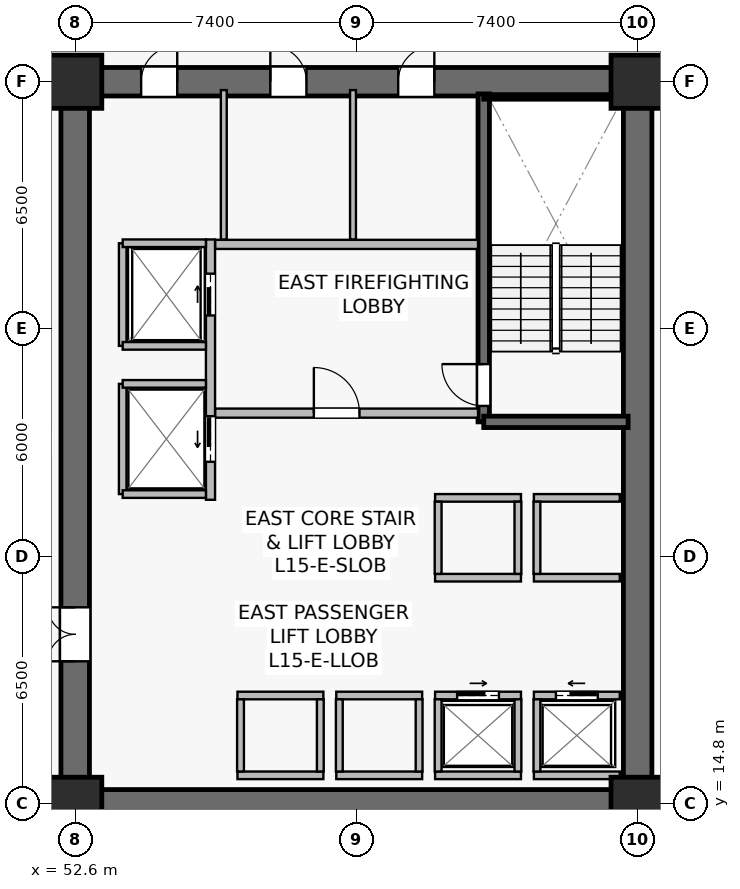
"""IFC4 building model, lengths in metres.
Left out: names, types, materials, properties, quantities, classifications, styles, units other than length and angle.
Written with IfcOpenShell. Run it as: python <this file> out.ifc"""

import sys

from ifc_helpers import new_model, si_unit, direction, frame, frame_2d, origin, origin_2d, place, context, subcontext, project, spatial, rectangle, extrude, source, transform, mapped, element, fill, save


model = new_model("IFC4")
c1 = context("Model", 3, precision=1e-05, world=origin(), true_north=direction((0.0, 1.0)))
c2 = subcontext(c1, "Body", "Model", "MODEL_VIEW")
j1 = project(units=[si_unit("LENGTHUNIT", "METRE"), si_unit("PLANEANGLEUNIT", "RADIAN")], contexts=[c1])
p1 = place(None, origin())
s1 = spatial("IfcSite", under=j1, at=p1, CompositionType="ELEMENT")
p2 = place(p1, origin())
s2 = spatial("IfcBuilding", under=s1, at=p2, CompositionType="ELEMENT")
p3 = place(p2, frame((0.0, 0.0, 62.1)))
s3 = spatial("IfcBuildingStorey", under=s2, at=p3, CompositionType="ELEMENT", Elevation=62.1)
p4 = place(p3, frame((52.225, 14.8, 0.0), z_axis=(0.0, 0.0, 1.0), x_axis=(1.0, 0.0, 0.0)))
e1 = element("IfcWall", 1, at=p4, inside=s3, PredefinedType="SHEAR", context=c2, shape_type="SweptSolid", body=[
    extrude(rectangle(XDim=15.55, YDim=0.75, at=frame_2d((7.775, 0.0))), origin(), (0.0, 0.0, 1.0), 3.78),
])
p5 = place(p3, frame((52.225, 33.8, 0.0), z_axis=(0.0, 0.0, 1.0), x_axis=(1.0, 0.0, 0.0)))
e2 = element("IfcWall", 2, at=p5, inside=s3, PredefinedType="SHEAR", context=c2, shape_type="SweptSolid", body=[
    extrude(rectangle(XDim=15.55, YDim=0.75, at=frame_2d((7.775, 0.0))), origin(), (0.0, 0.0, 1.0), 3.78),
])
p6 = place(p5, frame((8.875, 0.0, 0.0)))
e3 = element("IfcOpeningElement", 3, at=p6, cuts=e2, PredefinedType="OPENING", context=c2, shape_type="SweptSolid", body=[
    extrude(rectangle(XDim=0.95, YDim=2.15, at=frame_2d((0.475, 1.075))), frame((0.0, 0.385, 0.0), z_axis=(0.0, -1.0, 0.0), x_axis=(1.0, 0.0, 0.0)), (0.0, 0.0, 1.0), 0.77),
])
p7 = place(p5, frame((5.51, 0.0, 0.0)))
e4 = element("IfcOpeningElement", 4, at=p7, cuts=e2, PredefinedType="OPENING", context=c2, shape_type="SweptSolid", body=[
    extrude(rectangle(XDim=0.95, YDim=2.15, at=frame_2d((0.475, 1.075))), frame((0.0, 0.385, 0.0), z_axis=(0.0, -1.0, 0.0), x_axis=(1.0, 0.0, 0.0)), (0.0, 0.0, 1.0), 0.77),
])
p8 = place(p5, frame((2.11, 0.0, 0.0)))
e5 = element("IfcOpeningElement", 5, at=p8, cuts=e2, PredefinedType="OPENING", context=c2, shape_type="SweptSolid", body=[
    extrude(rectangle(XDim=0.95, YDim=2.15, at=frame_2d((0.475, 1.075))), frame((0.0, 0.385, 0.0), z_axis=(0.0, -1.0, 0.0), x_axis=(1.0, 0.0, 0.0)), (0.0, 0.0, 1.0), 0.77),
])
p9 = place(p3, frame((52.6, 15.175, 0.0), z_axis=(0.0, 0.0, 1.0), x_axis=(0.0, 1.0, 0.0)))
e6 = element("IfcWall", 6, at=p9, inside=s3, PredefinedType="SHEAR", context=c2, shape_type="SweptSolid", body=[
    extrude(rectangle(XDim=18.25, YDim=0.75, at=frame_2d((9.125, 0.0))), origin(), (0.0, 0.0, 1.0), 3.78),
])
p10 = place(p9, frame((3.375, 0.0, 0.0)))
e7 = element("IfcOpeningElement", 7, at=p10, cuts=e6, PredefinedType="OPENING", context=c2, shape_type="SweptSolid", body=[
    extrude(rectangle(XDim=1.42, YDim=2.2, at=frame_2d((0.71, 1.1))), frame((0.0, 0.385, 0.0), z_axis=(0.0, -1.0, 0.0), x_axis=(1.0, 0.0, 0.0)), (0.0, 0.0, 1.0), 0.77),
])
p11 = place(p3, frame((67.4, 15.175, 0.0), z_axis=(0.0, 0.0, 1.0), x_axis=(0.0, 1.0, 0.0)))
e8 = element("IfcWall", 8, at=p11, inside=s3, PredefinedType="SHEAR", context=c2, shape_type="SweptSolid", body=[
    extrude(rectangle(XDim=18.25, YDim=0.75, at=frame_2d((9.125, 0.0))), origin(), (0.0, 0.0, 1.0), 3.78),
])
p12 = place(p3, frame((63.35, 24.85, 0.0), z_axis=(0.0, 0.0, 1.0), x_axis=(0.0, 1.0, 0.0)))
e9 = element("IfcWall", 9, at=p12, inside=s3, PredefinedType="SHEAR", context=c2, shape_type="SweptSolid", body=[
    extrude(rectangle(XDim=8.63, YDim=0.3, at=frame_2d((4.315, 0.0))), origin(), (0.0, 0.0, 1.0), 3.78),
])
p13 = place(p12, frame((0.42, 0.0, 0.0)))
e10 = element("IfcOpeningElement", 10, at=p13, cuts=e9, PredefinedType="OPENING", context=c2, shape_type="SweptSolid", body=[
    extrude(rectangle(XDim=1.1, YDim=2.15, at=frame_2d((0.55, 1.075))), frame((0.0, 0.16, 0.0), z_axis=(0.0, -1.0, 0.0), x_axis=(1.0, 0.0, 0.0)), (0.0, 0.0, 1.0), 0.32),
])
p14 = place(p3, frame((63.35, 24.85, 0.0), z_axis=(0.0, 0.0, 1.0), x_axis=(1.0, 0.0, 0.0)))
e11 = element("IfcWall", 11, at=p14, inside=s3, PredefinedType="SHEAR", context=c2, shape_type="SweptSolid", body=[
    extrude(rectangle(XDim=3.8, YDim=0.3, at=frame_2d((1.9, 0.0))), origin(), (0.0, 0.0, 1.0), 3.78),
])
p15 = place(p3, frame((63.35, 33.4, 0.0), z_axis=(0.0, 0.0, 1.0), x_axis=(1.0, 0.0, 0.0)))
e12 = element("IfcWall", 12, at=p15, inside=s3, PredefinedType="SOLIDWALL", context=c2, shape_type="SweptSolid", body=[
    extrude(rectangle(XDim=3.72, YDim=0.12, at=frame_2d((1.86, 0.0))), origin(), (0.0, 0.0, 1.0), 3.78),
])
m1 = source(origin(), c2, "Body", "SweptSolid", [
    extrude(rectangle(XDim=1.4, YDim=1.4, at=origin_2d()), origin(), (0.0, 0.0, 1.0), 4.1),
])
for number, where, z_axis, x_axis in (
    (13, (52.6, 14.8, 0.0), (0.0, 0.0, 1.0), (1.0, 0.0, 0.0)),
    (14, (67.4, 14.8, 0.0), (0.0, 0.0, 1.0), (1.0, 0.0, 0.0)),
    (15, (52.6, 33.8, 0.0), (0.0, 0.0, 1.0), (1.0, 0.0, 0.0)),
    (16, (67.4, 33.8, 0.0), (0.0, 0.0, 1.0), (1.0, 0.0, 0.0)),
):
    element("IfcColumn", number, at=place(p3, frame(where, z_axis=z_axis, x_axis=x_axis)), inside=s3, PredefinedType="COLUMN", context=c2, shape_type="MappedRepresentation", body=[
        mapped(m1, transform((0.0, 0.0, 0.0), scale=1.0)),
    ])
p16 = place(p3, frame((56.28, 25.08, 0.0), z_axis=(0.0, 0.0, 1.0), x_axis=(1.0, 0.0, 0.0)))
e17 = element("IfcWall", 17, at=p16, inside=s3, PredefinedType="SOLIDWALL", context=c2, shape_type="SweptSolid", body=[
    extrude(rectangle(XDim=6.92, YDim=0.24, at=frame_2d((3.46, 0.0))), origin(), (0.0, 0.0, 1.0), 3.115),
])
p17 = place(p16, frame((2.6, 0.0, 0.0)))
e18 = element("IfcOpeningElement", 18, at=p17, cuts=e17, PredefinedType="OPENING", context=c2, shape_type="SweptSolid", body=[
    extrude(rectangle(XDim=1.2, YDim=2.16, at=frame_2d((0.6, 1.08))), frame((0.0, 0.13, 0.0), z_axis=(0.0, -1.0, 0.0), x_axis=(1.0, 0.0, 0.0)), (0.0, 0.0, 1.0), 0.26),
])
p18 = place(p3, frame((56.28, 29.52, 0.0), z_axis=(0.0, 0.0, 1.0), x_axis=(1.0, 0.0, 0.0)))
e19 = element("IfcWall", 19, at=p18, inside=s3, PredefinedType="SOLIDWALL", context=c2, shape_type="SweptSolid", body=[
    extrude(rectangle(XDim=6.92, YDim=0.24, at=frame_2d((3.46, 0.0))), origin(), (0.0, 0.0, 1.0), 3.115),
])
p19 = place(p3, frame((56.16, 22.8, 0.0), z_axis=(0.0, 0.0, 1.0), x_axis=(0.0, 1.0, 0.0)))
e20 = element("IfcWall", 20, at=p19, inside=s3, PredefinedType="SOLIDWALL", context=c2, shape_type="SweptSolid", body=[
    extrude(rectangle(XDim=6.85, YDim=0.24, at=frame_2d((3.425, 0.0))), origin(), (0.0, 0.0, 1.0), 2.865),
])
p20 = place(p19, frame((4.85, 0.0, 0.0)))
e21 = element("IfcOpeningElement", 21, at=p20, cuts=e20, PredefinedType="OPENING", context=c2, shape_type="SweptSolid", body=[
    extrude(rectangle(XDim=1.1, YDim=2.22, at=frame_2d((0.55, 1.11))), frame((0.0, 0.13, 0.0), z_axis=(0.0, -1.0, 0.0), x_axis=(1.0, 0.0, 0.0)), (0.0, 0.0, 1.0), 0.26),
])
p21 = place(p19, frame((1.0, 0.0, 0.0)))
e22 = element("IfcOpeningElement", 22, at=p21, cuts=e20, PredefinedType="OPENING", context=c2, shape_type="SweptSolid", body=[
    extrude(rectangle(XDim=1.2, YDim=2.22, at=frame_2d((0.6, 1.11))), frame((0.0, 0.13, 0.0), z_axis=(0.0, -1.0, 0.0), x_axis=(1.0, 0.0, 0.0)), (0.0, 0.0, 1.0), 0.26),
])
p22 = place(p3, frame((64.67, 17.65, 0.0), z_axis=(0.0, 0.0, 1.0), x_axis=(1.0, 0.0, 0.0)))
e23 = element("IfcWall", 23, at=p22, inside=s3, PredefinedType="SOLIDWALL", context=c2, shape_type="SweptSolid", body=[
    extrude(rectangle(XDim=2.26, YDim=0.2, at=frame_2d((1.13, 0.0))), origin(), (0.0, 0.0, 1.0), 3.78),
])
p23 = place(p22, frame((0.58, 0.0, 0.0)))
e24 = element("IfcOpeningElement", 24, at=p23, cuts=e23, PredefinedType="OPENING", context=c2, shape_type="SweptSolid", body=[
    extrude(rectangle(XDim=1.1, YDim=2.22, at=frame_2d((0.55, 1.11))), frame((0.0, 0.11, 0.0), z_axis=(0.0, -1.0, 0.0), x_axis=(1.0, 0.0, 0.0)), (0.0, 0.0, 1.0), 0.22),
])
p24 = place(p3, frame((64.67, 15.55, 0.0), z_axis=(0.0, 0.0, 1.0), x_axis=(1.0, 0.0, 0.0)))
e25 = element("IfcWall", 25, at=p24, inside=s3, PredefinedType="SOLIDWALL", context=c2, shape_type="SweptSolid", body=[
    extrude(rectangle(XDim=2.26, YDim=0.2, at=frame_2d((1.13, 0.0))), origin(), (0.0, 0.0, 1.0), 3.78),
])
p25 = place(p3, frame((64.75, 15.65, 0.0), z_axis=(0.0, 0.0, 1.0), x_axis=(0.0, 1.0, 0.0)))
e26 = element("IfcWall", 26, at=p25, inside=s3, PredefinedType="SOLIDWALL", context=c2, shape_type="SweptSolid", body=[
    extrude(rectangle(XDim=1.9, YDim=0.18, at=frame_2d((0.95, 0.0))), origin(), (0.0, 0.0, 1.0), 3.78),
])
p26 = place(p3, frame((62.07, 17.65, 0.0), z_axis=(0.0, 0.0, 1.0), x_axis=(1.0, 0.0, 0.0)))
e27 = element("IfcWall", 27, at=p26, inside=s3, PredefinedType="SOLIDWALL", context=c2, shape_type="SweptSolid", body=[
    extrude(rectangle(XDim=2.26, YDim=0.2, at=frame_2d((1.13, 0.0))), origin(), (0.0, 0.0, 1.0), 3.78),
])
p27 = place(p26, frame((0.58, 0.0, 0.0)))
e28 = element("IfcOpeningElement", 28, at=p27, cuts=e27, PredefinedType="OPENING", context=c2, shape_type="SweptSolid", body=[
    extrude(rectangle(XDim=1.1, YDim=2.22, at=frame_2d((0.55, 1.11))), frame((0.0, 0.11, 0.0), z_axis=(0.0, -1.0, 0.0), x_axis=(1.0, 0.0, 0.0)), (0.0, 0.0, 1.0), 0.22),
])
p28 = place(p3, frame((62.07, 15.55, 0.0), z_axis=(0.0, 0.0, 1.0), x_axis=(1.0, 0.0, 0.0)))
e29 = element("IfcWall", 29, at=p28, inside=s3, PredefinedType="SOLIDWALL", context=c2, shape_type="SweptSolid", body=[
    extrude(rectangle(XDim=2.26, YDim=0.2, at=frame_2d((1.13, 0.0))), origin(), (0.0, 0.0, 1.0), 3.78),
])
for number, where, z_axis, x_axis in (
    (30, (62.15, 15.65, 0.0), (0.0, 0.0, 1.0), (0.0, 1.0, 0.0)),
    (31, (64.25, 15.65, 0.0), (0.0, 0.0, 1.0), (0.0, 1.0, 0.0)),
):
    element("IfcWall", number, at=place(p3, frame(where, z_axis=z_axis, x_axis=x_axis)), inside=s3, PredefinedType="SOLIDWALL", context=c2, shape_type="SweptSolid", body=[
        extrude(rectangle(XDim=1.9, YDim=0.18, at=frame_2d((0.95, 0.0))), origin(), (0.0, 0.0, 1.0), 3.78),
    ])
for number, where, z_axis, x_axis in (
    (32, (59.47, 17.65, 0.0), (0.0, 0.0, 1.0), (1.0, 0.0, 0.0)),
    (33, (59.47, 15.55, 0.0), (0.0, 0.0, 1.0), (1.0, 0.0, 0.0)),
):
    element("IfcWall", number, at=place(p3, frame(where, z_axis=z_axis, x_axis=x_axis)), inside=s3, PredefinedType="SOLIDWALL", context=c2, shape_type="SweptSolid", body=[
        extrude(rectangle(XDim=2.26, YDim=0.2, at=frame_2d((1.13, 0.0))), origin(), (0.0, 0.0, 1.0), 3.115),
    ])
for number, where, z_axis, x_axis in (
    (34, (59.55, 15.65, 0.0), (0.0, 0.0, 1.0), (0.0, 1.0, 0.0)),
    (35, (61.65, 15.65, 0.0), (0.0, 0.0, 1.0), (0.0, 1.0, 0.0)),
):
    element("IfcWall", number, at=place(p3, frame(where, z_axis=z_axis, x_axis=x_axis)), inside=s3, PredefinedType="SOLIDWALL", context=c2, shape_type="SweptSolid", body=[
        extrude(rectangle(XDim=1.9, YDim=0.18, at=frame_2d((0.95, 0.0))), origin(), (0.0, 0.0, 1.0), 3.78),
    ])
for number, where, z_axis, x_axis in (
    (36, (56.87, 17.65, 0.0), (0.0, 0.0, 1.0), (1.0, 0.0, 0.0)),
    (37, (56.87, 15.55, 0.0), (0.0, 0.0, 1.0), (1.0, 0.0, 0.0)),
):
    element("IfcWall", number, at=place(p3, frame(where, z_axis=z_axis, x_axis=x_axis)), inside=s3, PredefinedType="SOLIDWALL", context=c2, shape_type="SweptSolid", body=[
        extrude(rectangle(XDim=2.26, YDim=0.2, at=frame_2d((1.13, 0.0))), origin(), (0.0, 0.0, 1.0), 3.78),
    ])
for number, where, z_axis, x_axis in (
    (38, (56.95, 15.65, 0.0), (0.0, 0.0, 1.0), (0.0, 1.0, 0.0)),
    (39, (59.05, 15.65, 0.0), (0.0, 0.0, 1.0), (0.0, 1.0, 0.0)),
):
    element("IfcWall", number, at=place(p3, frame(where, z_axis=z_axis, x_axis=x_axis)), inside=s3, PredefinedType="SOLIDWALL", context=c2, shape_type="SweptSolid", body=[
        extrude(rectangle(XDim=1.9, YDim=0.18, at=frame_2d((0.95, 0.0))), origin(), (0.0, 0.0, 1.0), 3.78),
    ])
for number, where, z_axis, x_axis in (
    (40, (64.67, 20.75, 0.0), (0.0, 0.0, 1.0), (1.0, 0.0, 0.0)),
    (41, (64.67, 22.85, 0.0), (0.0, 0.0, 1.0), (1.0, 0.0, 0.0)),
):
    element("IfcWall", number, at=place(p3, frame(where, z_axis=z_axis, x_axis=x_axis)), inside=s3, PredefinedType="SOLIDWALL", context=c2, shape_type="SweptSolid", body=[
        extrude(rectangle(XDim=2.26, YDim=0.2, at=frame_2d((1.13, 0.0))), origin(), (0.0, 0.0, 1.0), 3.78),
    ])
p29 = place(p3, frame((64.75, 20.85, 0.0), z_axis=(0.0, 0.0, 1.0), x_axis=(0.0, 1.0, 0.0)))
e42 = element("IfcWall", 42, at=p29, inside=s3, PredefinedType="SOLIDWALL", context=c2, shape_type="SweptSolid", body=[
    extrude(rectangle(XDim=1.9, YDim=0.18, at=frame_2d((0.95, 0.0))), origin(), (0.0, 0.0, 1.0), 3.78),
])
for number, where, z_axis, x_axis in (
    (43, (62.07, 20.75, 0.0), (0.0, 0.0, 1.0), (1.0, 0.0, 0.0)),
    (44, (62.07, 22.85, 0.0), (0.0, 0.0, 1.0), (1.0, 0.0, 0.0)),
):
    element("IfcWall", number, at=place(p3, frame(where, z_axis=z_axis, x_axis=x_axis)), inside=s3, PredefinedType="SOLIDWALL", context=c2, shape_type="SweptSolid", body=[
        extrude(rectangle(XDim=2.26, YDim=0.2, at=frame_2d((1.13, 0.0))), origin(), (0.0, 0.0, 1.0), 3.78),
    ])
for number, where, z_axis, x_axis in (
    (45, (62.15, 20.85, 0.0), (0.0, 0.0, 1.0), (0.0, 1.0, 0.0)),
    (46, (64.25, 20.85, 0.0), (0.0, 0.0, 1.0), (0.0, 1.0, 0.0)),
):
    element("IfcWall", number, at=place(p3, frame(where, z_axis=z_axis, x_axis=x_axis)), inside=s3, PredefinedType="SOLIDWALL", context=c2, shape_type="SweptSolid", body=[
        extrude(rectangle(XDim=1.9, YDim=0.18, at=frame_2d((0.95, 0.0))), origin(), (0.0, 0.0, 1.0), 3.78),
    ])
p30 = place(p3, frame((53.85, 26.85, 0.0), z_axis=(0.0, 0.0, 1.0), x_axis=(0.0, 1.0, 0.0)))
e47 = element("IfcWall", 47, at=p30, inside=s3, PredefinedType="SOLIDWALL", context=c2, shape_type="SweptSolid", body=[
    extrude(rectangle(XDim=2.7, YDim=0.2, at=frame_2d((1.35, 0.0))), origin(), (0.0, 0.0, 1.0), 3.78),
])
p31 = place(p3, frame((53.85, 29.55, 0.0), z_axis=(0.0, 0.0, 1.0), x_axis=(1.0, 0.0, 0.0)))
e48 = element("IfcWall", 48, at=p31, inside=s3, PredefinedType="SOLIDWALL", context=c2, shape_type="SweptSolid", body=[
    extrude(rectangle(XDim=2.19, YDim=0.2, at=frame_2d((1.095, 0.0))), origin(), (0.0, 0.0, 1.0), 3.78),
])
p32 = place(p3, frame((53.85, 26.85, 0.0), z_axis=(0.0, 0.0, 1.0), x_axis=(1.0, 0.0, 0.0)))
e49 = element("IfcWall", 49, at=p32, inside=s3, PredefinedType="SOLIDWALL", context=c2, shape_type="SweptSolid", body=[
    extrude(rectangle(XDim=2.19, YDim=0.2, at=frame_2d((1.095, 0.0))), origin(), (0.0, 0.0, 1.0), 3.177),
])
p33 = place(p3, frame((53.85, 22.95, 0.0), z_axis=(0.0, 0.0, 1.0), x_axis=(0.0, 1.0, 0.0)))
e50 = element("IfcWall", 50, at=p33, inside=s3, PredefinedType="SOLIDWALL", context=c2, shape_type="SweptSolid", body=[
    extrude(rectangle(XDim=2.9, YDim=0.2, at=frame_2d((1.45, 0.0))), origin(), (0.0, 0.0, 1.0), 2.865),
])
for number, where, z_axis, x_axis in (
    (51, (53.85, 25.85, 0.0), (0.0, 0.0, 1.0), (1.0, 0.0, 0.0)),
    (52, (53.85, 22.95, 0.0), (0.0, 0.0, 1.0), (1.0, 0.0, 0.0)),
):
    element("IfcWall", number, at=place(p3, frame(where, z_axis=z_axis, x_axis=x_axis)), inside=s3, PredefinedType="SOLIDWALL", context=c2, shape_type="SweptSolid", body=[
        extrude(rectangle(XDim=2.19, YDim=0.2, at=frame_2d((1.095, 0.0))), origin(), (0.0, 0.0, 1.0), 3.78),
    ])
p34 = place(p3, frame((59.91, 29.65, 0.0), z_axis=(0.0, 0.0, 1.0), x_axis=(0.0, 1.0, 0.0)))
e53 = element("IfcWall", 53, at=p34, inside=s3, PredefinedType="PLUMBINGWALL", context=c2, shape_type="SweptSolid", body=[
    extrude(rectangle(XDim=3.93, YDim=0.155, at=frame_2d((1.965, 0.0))), origin(), (0.0, 0.0, 1.0), 3.115),
])
p35 = place(p3, frame((56.51, 29.65, 0.0), z_axis=(0.0, 0.0, 1.0), x_axis=(0.0, 1.0, 0.0)))
e54 = element("IfcWall", 54, at=p35, inside=s3, PredefinedType="PLUMBINGWALL", context=c2, shape_type="SweptSolid", body=[
    extrude(rectangle(XDim=3.93, YDim=0.155, at=frame_2d((1.965, 0.0))), origin(), (0.0, 0.0, 1.0), 3.78),
])
m2 = source(origin(), c2, "Body", "SweptSolid", [
    extrude(rectangle(XDim=1.1, YDim=2.15, at=frame_2d((0.55, 1.075))), frame((0.0, 0.025, 0.0), z_axis=(0.0, -1.0, 0.0), x_axis=(1.0, 0.0, 0.0)), (0.0, 0.0, 1.0), 0.05),
])
p36 = place(p13, origin())
e55 = element("IfcDoor", 55, at=p36, inside=s3, OperationType="SINGLE_SWING_RIGHT", PredefinedType="DOOR", context=c2, shape_type="MappedRepresentation", body=[
    mapped(m2, transform((0.0, 0.0, 0.0), scale=1.0)),
])
fill(e10, e55)
m3 = source(origin(), c2, "Body", "SweptSolid", [
    extrude(rectangle(XDim=1.2, YDim=2.16, at=frame_2d((0.6, 1.08))), frame((0.0, 0.025, 0.0), z_axis=(0.0, -1.0, 0.0), x_axis=(1.0, 0.0, 0.0)), (0.0, 0.0, 1.0), 0.05),
])
p37 = place(p17, origin())
e56 = element("IfcDoor", 56, at=p37, inside=s3, OperationType="SINGLE_SWING_LEFT", PredefinedType="DOOR", context=c2, shape_type="MappedRepresentation", body=[
    mapped(m3, transform((0.0, 0.0, 0.0), scale=1.0)),
])
fill(e18, e56)
m4 = source(origin(), c2, "Body", "SweptSolid", [
    extrude(rectangle(XDim=1.1, YDim=2.22, at=frame_2d((0.55, 1.11))), frame((0.0, 0.025, 0.0), z_axis=(0.0, -1.0, 0.0), x_axis=(1.0, 0.0, 0.0)), (0.0, 0.0, 1.0), 0.05),
])
p38 = place(p23, origin())
e57 = element("IfcDoor", 57, at=p38, inside=s3, OperationType="SLIDING_TO_LEFT", PredefinedType="USERDEFINED", context=c2, shape_type="MappedRepresentation", body=[
    mapped(m4, transform((0.0, 0.0, 0.0), scale=1.0)),
])
fill(e24, e57)
p39 = place(p27, origin())
e58 = element("IfcDoor", 58, at=p39, inside=s3, OperationType="SLIDING_TO_RIGHT", PredefinedType="USERDEFINED", context=c2, shape_type="MappedRepresentation", body=[
    mapped(m4, transform((0.0, 0.0, 0.0), scale=1.0)),
])
fill(e28, e58)
p40 = place(p20, origin())
e59 = element("IfcDoor", 59, at=p40, inside=s3, OperationType="SLIDING_TO_RIGHT", PredefinedType="USERDEFINED", context=c2, shape_type="MappedRepresentation", body=[
    mapped(m4, transform((0.0, 0.0, 0.0), scale=1.0)),
])
fill(e21, e59)
m5 = source(origin(), c2, "Body", "SweptSolid", [
    extrude(rectangle(XDim=1.2, YDim=2.22, at=frame_2d((0.6, 1.11))), frame((0.0, 0.025, 0.0), z_axis=(0.0, -1.0, 0.0), x_axis=(1.0, 0.0, 0.0)), (0.0, 0.0, 1.0), 0.05),
])
p41 = place(p21, origin())
e60 = element("IfcDoor", 60, at=p41, inside=s3, OperationType="SLIDING_TO_LEFT", PredefinedType="USERDEFINED", context=c2, shape_type="MappedRepresentation", body=[
    mapped(m5, transform((0.0, 0.0, 0.0), scale=1.0)),
])
fill(e22, e60)
m6 = source(origin(), c2, "Body", "SweptSolid", [
    extrude(rectangle(XDim=1.42, YDim=2.2, at=frame_2d((0.71, 1.1))), frame((0.0, 0.025, 0.0), z_axis=(0.0, -1.0, 0.0), x_axis=(1.0, 0.0, 0.0)), (0.0, 0.0, 1.0), 0.05),
])
p42 = place(p10, origin())
e61 = element("IfcDoor", 61, at=p42, inside=s3, OperationType="DOUBLE_DOOR_SINGLE_SWING", PredefinedType="DOOR", context=c2, shape_type="MappedRepresentation", body=[
    mapped(m6, transform((0.0, 0.0, 0.0), scale=1.0)),
])
fill(e7, e61)
m7 = source(origin(), c2, "Body", "SweptSolid", [
    extrude(rectangle(XDim=0.95, YDim=2.15, at=frame_2d((0.475, 1.075))), frame((0.0, 0.025, 0.0), z_axis=(0.0, -1.0, 0.0), x_axis=(1.0, 0.0, 0.0)), (0.0, 0.0, 1.0), 0.05),
])
p43 = place(p6, origin())
e62 = element("IfcDoor", 62, at=p43, inside=s3, OperationType="SINGLE_SWING_RIGHT", PredefinedType="DOOR", context=c2, shape_type="MappedRepresentation", body=[
    mapped(m7, transform((0.0, 0.0, 0.0), scale=1.0)),
])
fill(e3, e62)
p44 = place(p7, origin())
e63 = element("IfcDoor", 63, at=p44, inside=s3, OperationType="SINGLE_SWING_LEFT", PredefinedType="DOOR", context=c2, shape_type="MappedRepresentation", body=[
    mapped(m7, transform((0.0, 0.0, 0.0), scale=1.0)),
])
fill(e4, e63)
p45 = place(p8, origin())
e64 = element("IfcDoor", 64, at=p45, inside=s3, OperationType="SINGLE_SWING_RIGHT", PredefinedType="DOOR", context=c2, shape_type="MappedRepresentation", body=[
    mapped(m7, transform((0.0, 0.0, 0.0), scale=1.0)),
])
fill(e5, e64)
save(model, sys.argv[1])
